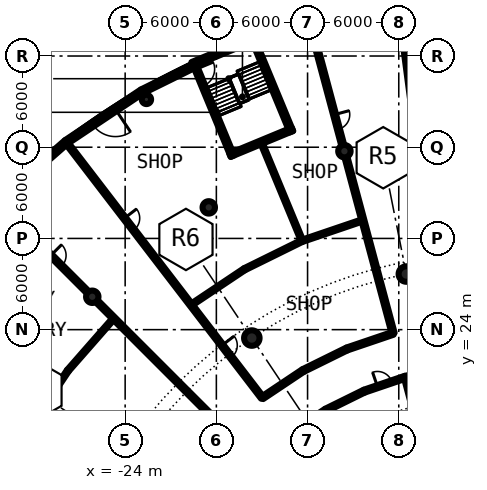
"""IFC4 building model, lengths in metres.
Left out: names, types, materials, properties, quantities, classifications, styles, units other than length and angle.
Written with IfcOpenShell. Run it as: python <this file> out.ifc"""

import sys

from ifc_helpers import new_model, si_unit, direction, frame, frame_2d, origin, origin_2d, place, context, subcontext, project, spatial, rectangle, hollow_circle, extrude, element, fill, save


model = new_model("IFC4")
c1 = context("Model", 3, precision=1e-05, world=origin(), true_north=direction((0.0, 1.0)))
c2 = subcontext(c1, "Body", "Model", "MODEL_VIEW")
j1 = project(units=[si_unit("LENGTHUNIT", "METRE"), si_unit("PLANEANGLEUNIT", "RADIAN")], contexts=[c1])
p1 = place(None, origin())
s1 = spatial("IfcSite", under=j1, at=p1, CompositionType="ELEMENT")
p2 = place(p1, origin())
s2 = spatial("IfcBuilding", under=s1, at=p2, CompositionType="ELEMENT")
p3 = place(p2, origin())
s3 = spatial("IfcBuildingStorey", under=s2, at=p3, CompositionType="ELEMENT", Elevation=0.0)
for number, where, z_axis, x_axis in (
    (1, (-5.501, 27.658, -0.5), (0.0, 0.0, 1.0), (1.0, 0.0, 0.0)),
    (2, (-15.667, 23.448, -0.5), (0.0, 0.0, 1.0), (1.0, 0.0, 0.0)),
):
    element("IfcColumn", number, at=place(p3, frame(where, z_axis=z_axis, x_axis=x_axis)), inside=s3, PredefinedType="COLUMN", context=c2, shape_type="SweptSolid", body=[
        extrude(hollow_circle(Radius=0.508, WallThickness=0.05, at=origin_2d()), origin(), (0.0, 0.0, 1.0), 5.9),
    ])
for number, where, z_axis, x_axis in (
    (3, (-9.576, 35.739, -0.5), (0.0, 0.0, 1.0), (1.0, 0.0, 0.0)),
    (4, (-18.5, 32.043, -0.5), (0.0, 0.0, 1.0), (1.0, 0.0, 0.0)),
    (5, (-26.163, 26.163, -0.5), (0.0, 0.0, 1.0), (1.0, 0.0, 0.0)),
):
    element("IfcColumn", number, at=place(p3, frame(where, z_axis=z_axis, x_axis=x_axis)), inside=s3, PredefinedType="COLUMN", context=c2, shape_type="SweptSolid", body=[
        extrude(hollow_circle(Radius=0.406, WallThickness=0.03, at=origin_2d()), origin(), (0.0, 0.0, 1.0), 5.9),
    ])
p4 = place(p3, frame((-22.6, 39.144, -0.5), z_axis=(0.0, 0.0, 1.0), x_axis=(1.0, 0.0, 0.0)))
e6 = element("IfcColumn", 6, at=p4, inside=s3, PredefinedType="COLUMN", context=c2, shape_type="SweptSolid", body=[
    extrude(hollow_circle(Radius=0.305, WallThickness=0.025, at=origin_2d()), origin(), (0.0, 0.0, 1.0), 5.9),
])
p5 = place(p3, frame((-19.527, 41.327, 0.0), z_axis=(0.0, 0.0, 1.0), x_axis=(-0.896919197762, -0.44219447383, 0.0)))
e7 = element("IfcWall", 7, at=p5, inside=s3, PredefinedType="SOLIDWALL", context=c2, shape_type="SweptSolid", body=[
    extrude(rectangle(XDim=3.76, YDim=0.3, at=frame_2d((1.88, 0.0))), origin(), (0.0, 0.0, 1.0), 4.95),
])
p6 = place(p3, frame((-22.9, 39.664, 0.0), z_axis=(0.0, 0.0, 1.0), x_axis=(-0.831485590074, -0.55554631985, 0.0)))
e8 = element("IfcWall", 8, at=p6, inside=s3, PredefinedType="SOLIDWALL", context=c2, shape_type="SweptSolid", body=[
    extrude(rectangle(XDim=5.991, YDim=0.3, at=frame_2d((2.995, 0.0))), origin(), (0.0, 0.0, 1.0), 4.95),
])
p7 = place(p6, frame((2.095, 0.0, 0.0)))
e9 = element("IfcOpeningElement", 9, at=p7, cuts=e8, PredefinedType="OPENING", context=c2, shape_type="SweptSolid", body=[
    extrude(rectangle(XDim=1.8, YDim=2.2, at=frame_2d((0.9, 1.1))), frame((0.0, 0.16, 0.0), z_axis=(0.0, -1.0, 0.0), x_axis=(1.0, 0.0, 0.0)), (0.0, 0.0, 1.0), 0.32),
])
p8 = place(p3, frame((-27.881, 36.336, 0.0), z_axis=(0.0, 0.0, 1.0), x_axis=(-0.751748126189, -0.659450342916, 0.0)))
e10 = element("IfcWall", 10, at=p8, inside=s3, PredefinedType="SOLIDWALL", context=c2, shape_type="SweptSolid", body=[
    extrude(rectangle(XDim=5.991, YDim=0.3, at=frame_2d((2.996, 0.0))), origin(), (0.0, 0.0, 1.0), 4.95),
])
p9 = place(p8, frame((1.396, 0.0, 0.3)))
e11 = element("IfcOpeningElement", 11, at=p9, cuts=e10, PredefinedType="OPENING", context=c2, shape_type="SweptSolid", body=[
    extrude(rectangle(XDim=3.2, YDim=3.6, at=frame_2d((1.6, 1.8))), frame((0.0, 0.16, 0.0), z_axis=(0.0, -1.0, 0.0), x_axis=(1.0, 0.0, 0.0)), (0.0, 0.0, 1.0), 0.32),
])
p10 = place(p3, frame((-19.41, 41.372, 0.0), z_axis=(0.0, 0.0, 1.0), x_axis=(0.382666023753, -0.923886743203, 0.0)))
e12 = element("IfcWall", 12, at=p10, inside=s3, PredefinedType="SHEAR", context=c2, shape_type="SweptSolid", body=[
    extrude(rectangle(XDim=6.45, YDim=0.25, at=frame_2d((3.225, 0.0))), origin(), (0.0, 0.0, 1.0), 5.4),
])
p11 = place(p10, frame((0.25, 0.0, 0.0)))
e13 = element("IfcOpeningElement", 13, at=p11, cuts=e12, PredefinedType="OPENING", context=c2, shape_type="SweptSolid", body=[
    extrude(rectangle(XDim=1.2, YDim=2.3, at=frame_2d((0.6, 1.15))), frame((0.0, 0.135, 0.0), z_axis=(0.0, -1.0, 0.0), x_axis=(1.0, 0.0, 0.0)), (0.0, 0.0, 1.0), 0.27),
])
p12 = place(p3, frame((-13.061, 37.02, 0.0), z_axis=(0.0, 0.0, 1.0), x_axis=(-0.38267940576, 0.923881200375, 0.0)))
e14 = element("IfcWall", 14, at=p12, inside=s3, PredefinedType="SHEAR", context=c2, shape_type="SweptSolid", body=[
    extrude(rectangle(XDim=6.45, YDim=0.25, at=frame_2d((3.225, 0.0))), origin(), (0.0, 0.0, 1.0), 5.4),
])
p13 = place(p3, frame((-12.993, 37.183, 0.0), z_axis=(0.0, 0.0, 1.0), x_axis=(-0.923867048273, -0.382713570591, 0.0)))
e15 = element("IfcWall", 15, at=p13, inside=s3, PredefinedType="SHEAR", context=c2, shape_type="SweptSolid", body=[
    extrude(rectangle(XDim=4.45, YDim=0.25, at=frame_2d((2.225, 0.0))), origin(), (0.0, 0.0, 1.0), 5.4),
])
p14 = place(p3, frame((-19.583, 41.462, 0.0), z_axis=(0.0, 0.0, 1.0), x_axis=(0.923886445216, 0.382666743194, 0.0)))
e16 = element("IfcWall", 16, at=p14, inside=s3, PredefinedType="SHEAR", context=c2, shape_type="SweptSolid", body=[
    extrude(rectangle(XDim=4.45, YDim=0.3, at=frame_2d((2.225, 0.0))), origin(), (0.0, 0.0, 1.0), 5.4),
])
p15 = place(p14, frame((1.625, 0.0, 0.0)))
e17 = element("IfcOpeningElement", 17, at=p15, cuts=e16, PredefinedType="OPENING", context=c2, shape_type="SweptSolid", body=[
    extrude(rectangle(XDim=1.2, YDim=2.3, at=frame_2d((0.6, 1.15))), frame((0.0, 0.16, 0.0), z_axis=(0.0, -1.0, 0.0), x_axis=(1.0, 0.0, 0.0)), (0.0, 0.0, 1.0), 0.32),
])
p16 = place(p3, frame((-31.746, 31.746, 0.0), z_axis=(0.0, 0.0, 1.0), x_axis=(0.707106781187, -0.707106781187, 0.0)))
e18 = element("IfcWall", 18, at=p16, inside=s3, PredefinedType="PARTITIONING", context=c2, shape_type="SweptSolid", body=[
    extrude(rectangle(XDim=7.49, YDim=0.2, at=frame_2d((3.745, 0.0))), origin(), (0.0, 0.0, 1.0), 4.95),
])
p17 = place(p16, frame((4.045, 0.0, 0.0)))
e19 = element("IfcOpeningElement", 19, at=p17, cuts=e18, PredefinedType="OPENING", context=c2, shape_type="SweptSolid", body=[
    extrude(rectangle(XDim=1.0, YDim=2.3, at=frame_2d((0.5, 1.15))), frame((0.0, 0.11, 0.0), z_axis=(0.0, -1.0, 0.0), x_axis=(1.0, 0.0, 0.0)), (0.0, 0.0, 1.0), 0.22),
])
p18 = place(p3, frame((-27.813, 36.247, 0.0), z_axis=(0.0, 0.0, 1.0), x_axis=(0.608725588574, -0.793380840338, 0.0)))
e20 = element("IfcWall", 20, at=p18, inside=s3, PredefinedType="PARTITIONING", context=c2, shape_type="SweptSolid", body=[
    extrude(rectangle(XDim=21.088, YDim=0.2, at=frame_2d((10.544, 0.0))), origin(), (0.0, 0.0, 1.0), 4.95),
])
p19 = place(p18, frame((16.738, 0.0, 0.0)))
e21 = element("IfcOpeningElement", 21, at=p19, cuts=e20, PredefinedType="OPENING", context=c2, shape_type="SweptSolid", body=[
    extrude(rectangle(XDim=1.0, YDim=2.3, at=frame_2d((0.5, 1.15))), frame((0.0, 0.11, 0.0), z_axis=(0.0, -1.0, 0.0), x_axis=(1.0, 0.0, 0.0)), (0.0, 0.0, 1.0), 0.22),
])
p20 = place(p18, frame((6.194, 0.0, 0.0)))
e22 = element("IfcOpeningElement", 22, at=p20, cuts=e20, PredefinedType="OPENING", context=c2, shape_type="SweptSolid", body=[
    extrude(rectangle(XDim=1.0, YDim=2.3, at=frame_2d((0.5, 1.15))), frame((0.0, 0.11, 0.0), z_axis=(0.0, -1.0, 0.0), x_axis=(1.0, 0.0, 0.0)), (0.0, 0.0, 1.0), 0.22),
])
p21 = place(p3, frame((-25.876, 25.876, 0.0), z_axis=(0.0, 0.0, 1.0), x_axis=(0.707106781187, -0.707106781187, 0.0)))
e23 = element("IfcWall", 23, at=p21, inside=s3, PredefinedType="PARTITIONING", context=c2, shape_type="SweptSolid", body=[
    extrude(rectangle(XDim=11.994, YDim=0.2, at=frame_2d((5.997, 0.0))), origin(), (0.0, 0.0, 1.0), 4.95),
])
p22 = place(p3, frame((-14.994, 36.198, 0.0), z_axis=(0.0, 0.0, 1.0), x_axis=(0.382644279815, -0.923895749057, 0.0)))
e24 = element("IfcWall", 24, at=p22, inside=s3, PredefinedType="PARTITIONING", context=c2, shape_type="SweptSolid", body=[
    extrude(rectangle(XDim=6.881, YDim=0.15, at=frame_2d((3.44, 0.0))), origin(), (0.0, 0.0, 1.0), 4.95),
])
p23 = place(p3, frame((-11.624, 43.37, 0.0), z_axis=(0.0, 0.0, 1.0), x_axis=(0.258768624905, -0.96593933493, 0.0)))
e25 = element("IfcWall", 25, at=p23, inside=s3, PredefinedType="PARTITIONING", context=c2, shape_type="SweptSolid", body=[
    extrude(rectangle(XDim=7.5, YDim=0.2, at=frame_2d((3.75, 0.0))), origin(), (0.0, 0.0, 1.0), 4.95),
])
p24 = place(p23, frame((5.407, 0.0, 0.0)))
e26 = element("IfcOpeningElement", 26, at=p24, cuts=e25, PredefinedType="OPENING", context=c2, shape_type="SweptSolid", body=[
    extrude(rectangle(XDim=1.0, YDim=2.3, at=frame_2d((0.5, 1.15))), frame((0.0, 0.11, 0.0), z_axis=(0.0, -1.0, 0.0), x_axis=(1.0, 0.0, 0.0)), (0.0, 0.0, 1.0), 0.22),
])
p25 = place(p3, frame((-10.8, 18.706, 0.0), z_axis=(0.0, 0.0, 1.0), x_axis=(0.500015767406, -0.866016300277, 0.0)))
e27 = element("IfcWall", 27, at=p25, inside=s3, PredefinedType="PARTITIONING", context=c2, shape_type="SweptSolid", body=[
    extrude(rectangle(XDim=5.5, YDim=0.15, at=frame_2d((2.75, 0.0))), origin(), (0.0, 0.0, 1.0), 4.95),
])
p26 = place(p3, frame((-9.476, 35.353, 0.0), z_axis=(0.0, 0.0, 1.0), x_axis=(0.258904538468, -0.965902914356, 0.0)))
e28 = element("IfcWall", 28, at=p26, inside=s3, PredefinedType="PARTITIONING", context=c2, shape_type="SweptSolid", body=[
    extrude(rectangle(XDim=12.001, YDim=0.2, at=frame_2d((6.0, 0.0))), origin(), (0.0, 0.0, 1.0), 4.95),
])
p27 = place(p3, frame((-5.963, 45.297, 0.0), z_axis=(0.0, 0.0, 1.0), x_axis=(0.130501232125, -0.991448147113, 0.0)))
e29 = element("IfcWall", 29, at=p27, inside=s3, PredefinedType="PARTITIONING", context=c2, shape_type="SweptSolid", body=[
    extrude(rectangle(XDim=21.088, YDim=0.2, at=frame_2d((10.544, 0.0))), origin(), (0.0, 0.0, 1.0), 4.95),
])
p28 = place(p27, frame((15.687, 0.0, 0.0)))
e30 = element("IfcOpeningElement", 30, at=p28, cuts=e29, PredefinedType="OPENING", context=c2, shape_type="SweptSolid", body=[
    extrude(rectangle(XDim=1.0, YDim=2.3, at=frame_2d((0.5, 1.15))), frame((0.0, 0.11, 0.0), z_axis=(0.0, -1.0, 0.0), x_axis=(1.0, 0.0, 0.0)), (0.0, 0.0, 1.0), 0.22),
])
p29 = place(p27, frame((5.144, 0.0, 0.0)))
e31 = element("IfcOpeningElement", 31, at=p29, cuts=e29, PredefinedType="OPENING", context=c2, shape_type="SweptSolid", body=[
    extrude(rectangle(XDim=1.0, YDim=2.3, at=frame_2d((0.5, 1.15))), frame((0.0, 0.11, 0.0), z_axis=(0.0, -1.0, 0.0), x_axis=(1.0, 0.0, 0.0)), (0.0, 0.0, 1.0), 0.22),
])
p30 = place(p3, frame((-5.593, 20.863, 0.0), z_axis=(0.0, 0.0, 1.0), x_axis=(0.258897298886, -0.965904854853, 0.0)))
e32 = element("IfcWall", 32, at=p30, inside=s3, PredefinedType="PARTITIONING", context=c2, shape_type="SweptSolid", body=[
    extrude(rectangle(XDim=5.5, YDim=0.15, at=frame_2d((2.75, 0.0))), origin(), (0.0, 0.0, 1.0), 4.95),
])
p31 = place(p3, frame((-13.149, 17.136, 0.0), z_axis=(0.0, 0.0, 1.0), x_axis=(0.831371669473, 0.55571678686, 0.0)))
e33 = element("IfcWall", 33, at=p31, inside=s3, PredefinedType="PARTITIONING", context=c2, shape_type="SweptSolid", body=[
    extrude(rectangle(XDim=2.825, YDim=0.2, at=frame_2d((1.413, 0.0))), origin(), (0.0, 0.0, 1.0), 4.95),
])
p32 = place(p31, frame((0.913, 0.0, 0.0)))
e34 = element("IfcOpeningElement", 34, at=p32, cuts=e33, PredefinedType="OPENING", context=c2, shape_type="SweptSolid", body=[
    extrude(rectangle(XDim=1.0, YDim=2.3, at=frame_2d((0.5, 1.15))), frame((0.0, 0.11, 0.0), z_axis=(0.0, -1.0, 0.0), x_axis=(1.0, 0.0, 0.0)), (0.0, 0.0, 1.0), 0.22),
])
p33 = place(p3, frame((-10.8, 18.706, 0.0), z_axis=(0.0, 0.0, 1.0), x_axis=(0.896816398134, 0.442402924988, 0.0)))
e35 = element("IfcWall", 35, at=p33, inside=s3, PredefinedType="PARTITIONING", context=c2, shape_type="SweptSolid", body=[
    extrude(rectangle(XDim=2.825, YDim=0.2, at=frame_2d((1.413, 0.0))), origin(), (0.0, 0.0, 1.0), 4.95),
])
p34 = place(p3, frame((-8.266, 19.956, 0.0), z_axis=(0.0, 0.0, 1.0), x_axis=(0.946976353269, 0.321303262276, 0.0)))
e36 = element("IfcWall", 36, at=p34, inside=s3, PredefinedType="PARTITIONING", context=c2, shape_type="SweptSolid", body=[
    extrude(rectangle(XDim=2.826, YDim=0.2, at=frame_2d((1.413, 0.0))), origin(), (0.0, 0.0, 1.0), 4.95),
])
p35 = place(p34, frame((0.913, 0.0, 0.0)))
e37 = element("IfcOpeningElement", 37, at=p35, cuts=e36, PredefinedType="OPENING", context=c2, shape_type="SweptSolid", body=[
    extrude(rectangle(XDim=1.0, YDim=2.3, at=frame_2d((0.5, 1.15))), frame((0.0, 0.11, 0.0), z_axis=(0.0, -1.0, 0.0), x_axis=(1.0, 0.0, 0.0)), (0.0, 0.0, 1.0), 0.22),
])
p36 = place(p3, frame((-5.59, 20.864, 0.0), z_axis=(0.0, 0.0, 1.0), x_axis=(0.980796115138, 0.195035844217, 0.0)))
e38 = element("IfcWall", 38, at=p36, inside=s3, PredefinedType="PARTITIONING", context=c2, shape_type="SweptSolid", body=[
    extrude(rectangle(XDim=2.825, YDim=0.2, at=frame_2d((1.413, 0.0))), origin(), (0.0, 0.0, 1.0), 4.95),
])
p37 = place(p36, frame((0.913, 0.0, 0.0)))
e39 = element("IfcOpeningElement", 39, at=p37, cuts=e38, PredefinedType="OPENING", context=c2, shape_type="SweptSolid", body=[
    extrude(rectangle(XDim=1.0, YDim=2.3, at=frame_2d((0.5, 1.15))), frame((0.0, 0.11, 0.0), z_axis=(0.0, -1.0, 0.0), x_axis=(1.0, 0.0, 0.0)), (0.0, 0.0, 1.0), 0.22),
])
p38 = place(p3, frame((-14.976, 19.516, 0.0), z_axis=(0.0, 0.0, 1.0), x_axis=(0.831501361433, 0.555522714148, 0.0)))
e40 = element("IfcWall", 40, at=p38, inside=s3, PredefinedType="PARTITIONING", context=c2, shape_type="SweptSolid", body=[
    extrude(rectangle(XDim=3.218, YDim=0.2, at=frame_2d((1.609, 0.0))), origin(), (0.0, 0.0, 1.0), 4.95),
])
p39 = place(p3, frame((-12.3, 21.304, 0.0), z_axis=(0.0, 0.0, 1.0), x_axis=(0.896886949195, 0.442259878763, 0.0)))
e41 = element("IfcWall", 41, at=p39, inside=s3, PredefinedType="PARTITIONING", context=c2, shape_type="SweptSolid", body=[
    extrude(rectangle(XDim=3.218, YDim=0.2, at=frame_2d((1.609, 0.0))), origin(), (0.0, 0.0, 1.0), 4.95),
])
p40 = place(p3, frame((-9.414, 22.727, 0.0), z_axis=(0.0, 0.0, 1.0), x_axis=(0.946877665823, 0.321593976879, 0.0)))
e42 = element("IfcWall", 42, at=p40, inside=s3, PredefinedType="PARTITIONING", context=c2, shape_type="SweptSolid", body=[
    extrude(rectangle(XDim=3.218, YDim=0.2, at=frame_2d((1.609, 0.0))), origin(), (0.0, 0.0, 1.0), 4.95),
])
p41 = place(p3, frame((-19.663, 25.625, 0.0), z_axis=(0.0, 0.0, 1.0), x_axis=(0.831418647409, 0.555646499801, 0.0)))
e43 = element("IfcWall", 43, at=p41, inside=s3, PredefinedType="PARTITIONING", context=c2, shape_type="SweptSolid", body=[
    extrude(rectangle(XDim=4.226, YDim=0.15, at=frame_2d((2.113, 0.0))), origin(), (0.0, 0.0, 1.0), 4.95),
])
p42 = place(p3, frame((-16.15, 27.973, 0.0), z_axis=(0.0, 0.0, 1.0), x_axis=(0.896898505061, 0.442236443116, 0.0)))
e44 = element("IfcWall", 44, at=p42, inside=s3, PredefinedType="PARTITIONING", context=c2, shape_type="SweptSolid", body=[
    extrude(rectangle(XDim=4.224, YDim=0.15, at=frame_2d((2.112, 0.0))), origin(), (0.0, 0.0, 1.0), 4.95),
])
p43 = place(p3, frame((-12.361, 29.841, 0.0), z_axis=(0.0, 0.0, 1.0), x_axis=(0.946947300987, 0.32138887528, 0.0)))
e45 = element("IfcWall", 45, at=p43, inside=s3, PredefinedType="PARTITIONING", context=c2, shape_type="SweptSolid", body=[
    extrude(rectangle(XDim=4.225, YDim=0.15, at=frame_2d((2.113, 0.0))), origin(), (0.0, 0.0, 1.0), 4.95),
])
p44 = place(p3, frame((-30.311, 17.5, 0.0), z_axis=(0.0, 0.0, 1.0), x_axis=(0.555610431873, 0.831442750882, 0.0)))
e46 = element("IfcWall", 46, at=p44, inside=s3, PredefinedType="PARTITIONING", context=c2, shape_type="SweptSolid", body=[
    extrude(rectangle(XDim=4.579, YDim=0.15, at=frame_2d((2.289, 0.0))), origin(), (0.0, 0.0, 1.0), 4.95),
])
p45 = place(p3, frame((-27.767, 21.307, 0.0), z_axis=(0.0, 0.0, 1.0), x_axis=(0.659270714245, 0.751905662526, 0.0)))
e47 = element("IfcWall", 47, at=p45, inside=s3, PredefinedType="PARTITIONING", context=c2, shape_type="SweptSolid", body=[
    extrude(rectangle(XDim=4.578, YDim=0.15, at=frame_2d((2.289, 0.0))), origin(), (0.0, 0.0, 1.0), 4.95),
])
p46 = place(p7, origin())
e48 = element("IfcDoor", 48, at=p46, inside=s3, OperationType="SINGLE_SWING_LEFT", PredefinedType="DOOR", context=c2, shape_type="SweptSolid", body=[
    extrude(rectangle(XDim=1.8, YDim=2.2, at=frame_2d((0.9, 1.1))), frame((0.0, 0.025, 0.0), z_axis=(0.0, -1.0, 0.0), x_axis=(1.0, 0.0, 0.0)), (0.0, 0.0, 1.0), 0.05),
])
fill(e9, e48)
p47 = place(p11, origin())
e49 = element("IfcDoor", 49, at=p47, inside=s3, OperationType="SINGLE_SWING_RIGHT", PredefinedType="DOOR", context=c2, shape_type="SweptSolid", body=[
    extrude(rectangle(XDim=1.2, YDim=2.3, at=frame_2d((0.6, 1.15))), frame((0.0, 0.025, 0.0), z_axis=(0.0, -1.0, 0.0), x_axis=(1.0, 0.0, 0.0)), (0.0, 0.0, 1.0), 0.05),
])
fill(e13, e49)
p48 = place(p15, origin())
e50 = element("IfcDoor", 50, at=p48, inside=s3, OperationType="SINGLE_SWING_LEFT", PredefinedType="DOOR", context=c2, shape_type="SweptSolid", body=[
    extrude(rectangle(XDim=1.2, YDim=2.3, at=frame_2d((0.6, 1.15))), frame((0.0, 0.025, 0.0), z_axis=(0.0, -1.0, 0.0), x_axis=(1.0, 0.0, 0.0)), (0.0, 0.0, 1.0), 0.05),
])
fill(e17, e50)
p49 = place(p35, origin())
e51 = element("IfcDoor", 51, at=p49, inside=s3, OperationType="SINGLE_SWING_RIGHT", PredefinedType="DOOR", context=c2, shape_type="SweptSolid", body=[
    extrude(rectangle(XDim=1.0, YDim=2.3, at=frame_2d((0.5, 1.15))), frame((0.0, 0.025, 0.0), z_axis=(0.0, -1.0, 0.0), x_axis=(1.0, 0.0, 0.0)), (0.0, 0.0, 1.0), 0.05),
])
fill(e37, e51)
p50 = place(p19, origin())
e52 = element("IfcDoor", 52, at=p50, inside=s3, OperationType="SINGLE_SWING_RIGHT", PredefinedType="DOOR", context=c2, shape_type="SweptSolid", body=[
    extrude(rectangle(XDim=1.0, YDim=2.3, at=frame_2d((0.5, 1.15))), frame((0.0, 0.025, 0.0), z_axis=(0.0, -1.0, 0.0), x_axis=(1.0, 0.0, 0.0)), (0.0, 0.0, 1.0), 0.05),
])
fill(e21, e52)
p51 = place(p24, origin())
e53 = element("IfcDoor", 53, at=p51, inside=s3, OperationType="SINGLE_SWING_RIGHT", PredefinedType="DOOR", context=c2, shape_type="SweptSolid", body=[
    extrude(rectangle(XDim=1.0, YDim=2.3, at=frame_2d((0.5, 1.15))), frame((0.0, 0.025, 0.0), z_axis=(0.0, -1.0, 0.0), x_axis=(1.0, 0.0, 0.0)), (0.0, 0.0, 1.0), 0.05),
])
fill(e26, e53)
p52 = place(p20, origin())
e54 = element("IfcDoor", 54, at=p52, inside=s3, OperationType="SINGLE_SWING_LEFT", PredefinedType="DOOR", context=c2, shape_type="SweptSolid", body=[
    extrude(rectangle(XDim=1.0, YDim=2.3, at=frame_2d((0.5, 1.15))), frame((0.0, 0.025, 0.0), z_axis=(0.0, -1.0, 0.0), x_axis=(1.0, 0.0, 0.0)), (0.0, 0.0, 1.0), 0.05),
])
fill(e22, e54)
p53 = place(p17, origin())
e55 = element("IfcDoor", 55, at=p53, inside=s3, OperationType="SINGLE_SWING_RIGHT", PredefinedType="DOOR", context=c2, shape_type="SweptSolid", body=[
    extrude(rectangle(XDim=1.0, YDim=2.3, at=frame_2d((0.5, 1.15))), frame((0.0, 0.025, 0.0), z_axis=(0.0, -1.0, 0.0), x_axis=(1.0, 0.0, 0.0)), (0.0, 0.0, 1.0), 0.05),
])
fill(e19, e55)
save(model, sys.argv[1])
